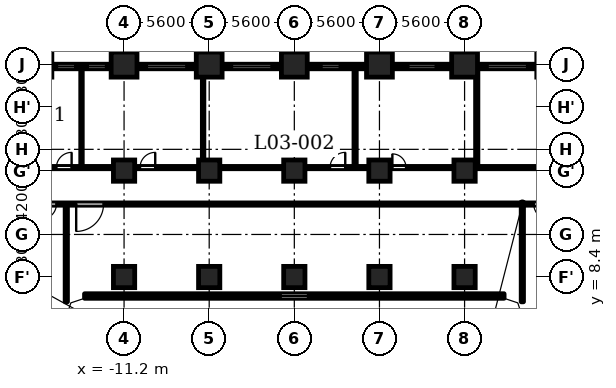
"""IFC4 building model, lengths in metres.
Left out: names, types, materials, properties, quantities, classifications, styles, units other than length and angle.
Written with IfcOpenShell. Run it as: python <this file> out.ifc"""

import sys

from ifc_helpers import new_model, si_unit, direction, frame, frame_2d, origin, origin_2d, place, context, subcontext, project, spatial, polyline, rectangle, outline, extrude, element, fill, save


model = new_model("IFC4")
c1 = context("Model", 3, precision=1e-05, world=origin(), true_north=direction((0.0, 1.0)))
c2 = subcontext(c1, "Body", "Model", "MODEL_VIEW")
j1 = project(units=[si_unit("LENGTHUNIT", "METRE"), si_unit("PLANEANGLEUNIT", "RADIAN")], contexts=[c1])
p1 = place(None, origin())
s1 = spatial("IfcSite", under=j1, at=p1, CompositionType="ELEMENT")
p2 = place(p1, origin())
s2 = spatial("IfcBuilding", under=s1, at=p2, CompositionType="ELEMENT")
p3 = place(p2, frame((0.0, 0.0, 16.1)))
s3 = spatial("IfcBuildingStorey", under=s2, at=p3, CompositionType="ELEMENT", Elevation=16.1)
for number, where, z_axis, x_axis in (
    (1, (11.2, 22.4, 0.0), (0.0, 0.0, 1.0), (1.0, 0.0, 0.0)),
    (2, (5.6, 22.4, 0.0), (0.0, 0.0, 1.0), (1.0, 0.0, 0.0)),
    (3, (0.0, 22.4, 0.0), (0.0, 0.0, 1.0), (1.0, 0.0, 0.0)),
    (4, (-5.6, 22.4, 0.0), (0.0, 0.0, 1.0), (1.0, 0.0, 0.0)),
    (5, (-11.2, 22.4, 0.0), (0.0, 0.0, 1.0), (1.0, 0.0, 0.0)),
):
    element("IfcColumn", number, at=place(p3, frame(where, z_axis=z_axis, x_axis=x_axis)), inside=s3, PredefinedType="COLUMN", context=c2, shape_type="SweptSolid", body=[
        extrude(rectangle(XDim=1.7, YDim=1.7, at=origin_2d()), origin(), (0.0, 0.0, 1.0), 4.8),
    ])
for number, where, z_axis, x_axis in (
    (6, (-11.2, 8.4, 0.0), (0.0, 0.0, 1.0), (1.0, 0.0, 0.0)),
    (7, (-5.6, 8.4, 0.0), (0.0, 0.0, 1.0), (1.0, 0.0, 0.0)),
    (8, (0.0, 8.4, 0.0), (0.0, 0.0, 1.0), (1.0, 0.0, 0.0)),
    (9, (5.6, 8.4, 0.0), (0.0, 0.0, 1.0), (1.0, 0.0, 0.0)),
    (10, (11.2, 8.4, 0.0), (0.0, 0.0, 1.0), (1.0, 0.0, 0.0)),
    (11, (-11.2, 15.4, 0.0), (0.0, 0.0, 1.0), (1.0, 0.0, 0.0)),
    (12, (-5.6, 15.4, 0.0), (0.0, 0.0, 1.0), (1.0, 0.0, 0.0)),
    (13, (0.0, 15.4, 0.0), (0.0, 0.0, 1.0), (1.0, 0.0, 0.0)),
    (14, (5.6, 15.4, 0.0), (0.0, 0.0, 1.0), (1.0, 0.0, 0.0)),
    (15, (11.2, 15.4, 0.0), (0.0, 0.0, 1.0), (1.0, 0.0, 0.0)),
):
    element("IfcColumn", number, at=place(p3, frame(where, z_axis=z_axis, x_axis=x_axis)), inside=s3, PredefinedType="COLUMN", context=c2, shape_type="SweptSolid", body=[
        extrude(rectangle(XDim=1.4, YDim=1.4, at=origin_2d()), origin(), (0.0, 0.0, 1.0), 4.8),
    ])
p4 = place(p3, frame((15.95, 22.25, 0.0), z_axis=(0.0, 0.0, 1.0), x_axis=(-1.0, 0.0, 0.0)))
e16 = element("IfcWall", 16, at=p4, inside=s3, PredefinedType="SOLIDWALL", context=c2, shape_type="SweptSolid", body=[
    extrude(rectangle(XDim=3.9, YDim=0.3, at=frame_2d((1.95, 0.0))), origin(), (0.0, 0.0, 1.0), 3.55),
])
p5 = place(p4, frame((0.637, 0.0, 0.9)))
e17 = element("IfcOpeningElement", 17, at=p5, cuts=e16, PredefinedType="OPENING", context=c2, shape_type="SweptSolid", body=[
    extrude(rectangle(XDim=2.6, YDim=1.25, at=frame_2d((1.3, 0.625))), frame((0.0, 0.16, 0.0), z_axis=(0.0, -1.0, 0.0), x_axis=(1.0, 0.0, 0.0)), (0.0, 0.0, 1.0), 0.32),
])
p6 = place(p3, frame((10.35, 22.25, 0.0), z_axis=(0.0, 0.0, 1.0), x_axis=(-1.0, 0.0, 0.0)))
e18 = element("IfcWall", 18, at=p6, inside=s3, PredefinedType="SOLIDWALL", context=c2, shape_type="SweptSolid", body=[
    extrude(rectangle(XDim=3.9, YDim=0.3, at=frame_2d((1.95, 0.0))), origin(), (0.0, 0.0, 1.0), 3.55),
])
p7 = place(p6, frame((1.05, 0.0, 0.9)))
e19 = element("IfcOpeningElement", 19, at=p7, cuts=e18, PredefinedType="OPENING", context=c2, shape_type="SweptSolid", body=[
    extrude(rectangle(XDim=1.8, YDim=1.25, at=frame_2d((0.9, 0.625))), frame((0.0, 0.16, 0.0), z_axis=(0.0, -1.0, 0.0), x_axis=(1.0, 0.0, 0.0)), (0.0, 0.0, 1.0), 0.32),
])
p8 = place(p3, frame((4.75, 22.25, 0.0), z_axis=(0.0, 0.0, 1.0), x_axis=(-1.0, 0.0, 0.0)))
e20 = element("IfcWall", 20, at=p8, inside=s3, PredefinedType="SOLIDWALL", context=c2, shape_type="SweptSolid", body=[
    extrude(rectangle(XDim=3.9, YDim=0.3, at=frame_2d((1.95, 0.0))), origin(), (0.0, 0.0, 1.0), 3.55),
])
p9 = place(p8, frame((1.762, 0.0, 0.6)))
e21 = element("IfcOpeningElement", 21, at=p9, cuts=e20, PredefinedType="OPENING", context=c2, shape_type="SweptSolid", body=[
    extrude(rectangle(XDim=1.2, YDim=1.55, at=frame_2d((0.6, 0.775))), frame((0.0, 0.16, 0.0), z_axis=(0.0, -1.0, 0.0), x_axis=(1.0, 0.0, 0.0)), (0.0, 0.0, 1.0), 0.32),
])
p10 = place(p3, frame((-0.85, 22.25, 0.0), z_axis=(0.0, 0.0, 1.0), x_axis=(-1.0, 0.0, 0.0)))
e22 = element("IfcWall", 22, at=p10, inside=s3, PredefinedType="SOLIDWALL", context=c2, shape_type="SweptSolid", body=[
    extrude(rectangle(XDim=3.9, YDim=0.3, at=frame_2d((1.95, 0.0))), origin(), (0.0, 0.0, 1.0), 3.55),
])
p11 = place(p10, frame((0.65, 0.0, 0.9)))
e23 = element("IfcOpeningElement", 23, at=p11, cuts=e22, PredefinedType="OPENING", context=c2, shape_type="SweptSolid", body=[
    extrude(rectangle(XDim=2.6, YDim=1.25, at=frame_2d((1.3, 0.625))), frame((0.0, 0.16, 0.0), z_axis=(0.0, -1.0, 0.0), x_axis=(1.0, 0.0, 0.0)), (0.0, 0.0, 1.0), 0.32),
])
p12 = place(p3, frame((-6.45, 22.25, 0.0), z_axis=(0.0, 0.0, 1.0), x_axis=(-1.0, 0.0, 0.0)))
e24 = element("IfcWall", 24, at=p12, inside=s3, PredefinedType="SOLIDWALL", context=c2, shape_type="SweptSolid", body=[
    extrude(rectangle(XDim=3.9, YDim=0.3, at=frame_2d((1.95, 0.0))), origin(), (0.0, 0.0, 1.0), 3.55),
])
p13 = place(p12, frame((0.65, 0.0, 0.9)))
e25 = element("IfcOpeningElement", 25, at=p13, cuts=e24, PredefinedType="OPENING", context=c2, shape_type="SweptSolid", body=[
    extrude(rectangle(XDim=2.6, YDim=1.25, at=frame_2d((1.3, 0.625))), frame((0.0, 0.16, 0.0), z_axis=(0.0, -1.0, 0.0), x_axis=(1.0, 0.0, 0.0)), (0.0, 0.0, 1.0), 0.32),
])
p14 = place(p3, frame((-12.05, 22.25, 0.0), z_axis=(0.0, 0.0, 1.0), x_axis=(-1.0, 0.0, 0.0)))
e26 = element("IfcWall", 26, at=p14, inside=s3, PredefinedType="SOLIDWALL", context=c2, shape_type="SweptSolid", body=[
    extrude(rectangle(XDim=3.9, YDim=0.3, at=frame_2d((1.95, 0.0))), origin(), (0.0, 0.0, 1.0), 3.55),
])
p15 = place(p14, frame((0.337, 0.0, 0.6)))
e27 = element("IfcOpeningElement", 27, at=p15, cuts=e26, PredefinedType="OPENING", context=c2, shape_type="SweptSolid", body=[
    extrude(rectangle(XDim=1.2, YDim=1.55, at=frame_2d((0.6, 0.775))), frame((0.0, 0.16, 0.0), z_axis=(0.0, -1.0, 0.0), x_axis=(1.0, 0.0, 0.0)), (0.0, 0.0, 1.0), 0.32),
])
p16 = place(p14, frame((2.363, 0.0, 0.6)))
e28 = element("IfcOpeningElement", 28, at=p16, cuts=e26, PredefinedType="OPENING", context=c2, shape_type="SweptSolid", body=[
    extrude(rectangle(XDim=1.2, YDim=1.55, at=frame_2d((0.6, 0.775))), frame((0.0, 0.16, 0.0), z_axis=(0.0, -1.0, 0.0), x_axis=(1.0, 0.0, 0.0)), (0.0, 0.0, 1.0), 0.32),
])
p17 = place(p3, frame((-13.8, 7.15, 0.0), z_axis=(0.0, 0.0, 1.0), x_axis=(1.0, 0.0, 0.0)))
e29 = element("IfcWall", 29, at=p17, inside=s3, PredefinedType="SOLIDWALL", context=c2, shape_type="SweptSolid", body=[
    extrude(rectangle(XDim=27.6, YDim=0.3, at=frame_2d((13.8, 0.0))), origin(), (0.0, 0.0, 1.0), 4.45),
])
p18 = place(p17, frame((12.9, 0.0, 0.9)))
e30 = element("IfcOpeningElement", 30, at=p18, cuts=e29, PredefinedType="OPENING", context=c2, shape_type="SweptSolid", body=[
    extrude(rectangle(XDim=1.8, YDim=1.25, at=frame_2d((0.9, 0.625))), frame((0.0, 0.16, 0.0), z_axis=(0.0, -1.0, 0.0), x_axis=(1.0, 0.0, 0.0)), (0.0, 0.0, 1.0), 0.32),
])
p19 = place(p3, frame((-17.4, 13.2, 0.0), z_axis=(0.0, 0.0, 1.0), x_axis=(1.0, 0.0, 0.0)))
e31 = element("IfcWall", 31, at=p19, inside=s3, PredefinedType="PARTITIONING", context=c2, shape_type="SweptSolid", body=[
    extrude(rectangle(XDim=34.8, YDim=0.15, at=frame_2d((17.4, 0.0))), origin(), (0.0, 0.0, 1.0), 4.45),
])
p20 = place(p19, frame((3.05, 0.0, 0.0)))
e32 = element("IfcOpeningElement", 32, at=p20, cuts=e31, PredefinedType="OPENING", context=c2, shape_type="SweptSolid", body=[
    extrude(rectangle(XDim=1.8, YDim=2.1, at=frame_2d((0.9, 1.05))), frame((0.0, 0.085, 0.0), z_axis=(0.0, -1.0, 0.0), x_axis=(1.0, 0.0, 0.0)), (0.0, 0.0, 1.0), 0.17),
])
p21 = place(p19, frame((0.75, 0.0, 0.0)))
e33 = element("IfcOpeningElement", 33, at=p21, cuts=e31, PredefinedType="OPENING", context=c2, shape_type="SweptSolid", body=[
    extrude(rectangle(XDim=1.0, YDim=2.1, at=frame_2d((0.5, 1.05))), frame((0.0, 0.085, 0.0), z_axis=(0.0, -1.0, 0.0), x_axis=(1.0, 0.0, 0.0)), (0.0, 0.0, 1.0), 0.17),
])
p22 = place(p19, frame((33.15, 0.0, 0.0)))
e34 = element("IfcOpeningElement", 34, at=p22, cuts=e31, PredefinedType="OPENING", context=c2, shape_type="SweptSolid", body=[
    extrude(rectangle(XDim=1.0, YDim=2.1, at=frame_2d((0.5, 1.05))), frame((0.0, 0.085, 0.0), z_axis=(0.0, -1.0, 0.0), x_axis=(1.0, 0.0, 0.0)), (0.0, 0.0, 1.0), 0.17),
])
p23 = place(p3, frame((-27.446, 15.6, 0.0), z_axis=(0.0, 0.0, 1.0), x_axis=(1.0, 0.0, 0.0)))
e35 = element("IfcWall", 35, at=p23, inside=s3, PredefinedType="PARTITIONING", context=c2, shape_type="SweptSolid", body=[
    extrude(rectangle(XDim=54.892, YDim=0.15, at=frame_2d((27.446, 0.0))), origin(), (0.0, 0.0, 1.0), 4.45),
])
p24 = place(p23, frame((11.796, 0.0, 0.0)))
e36 = element("IfcOpeningElement", 36, at=p24, cuts=e35, PredefinedType="OPENING", context=c2, shape_type="SweptSolid", body=[
    extrude(rectangle(XDim=1.0, YDim=2.1, at=frame_2d((0.5, 1.05))), frame((0.0, 0.085, 0.0), z_axis=(0.0, -1.0, 0.0), x_axis=(1.0, 0.0, 0.0)), (0.0, 0.0, 1.0), 0.17),
])
p25 = place(p23, frame((17.296, 0.0, 0.0)))
e37 = element("IfcOpeningElement", 37, at=p25, cuts=e35, PredefinedType="OPENING", context=c2, shape_type="SweptSolid", body=[
    extrude(rectangle(XDim=1.0, YDim=2.1, at=frame_2d((0.5, 1.05))), frame((0.0, 0.085, 0.0), z_axis=(0.0, -1.0, 0.0), x_axis=(1.0, 0.0, 0.0)), (0.0, 0.0, 1.0), 0.17),
])
p26 = place(p23, frame((29.796, 0.0, 0.0)))
e38 = element("IfcOpeningElement", 38, at=p26, cuts=e35, PredefinedType="OPENING", context=c2, shape_type="SweptSolid", body=[
    extrude(rectangle(XDim=1.0, YDim=2.1, at=frame_2d((0.5, 1.05))), frame((0.0, 0.085, 0.0), z_axis=(0.0, -1.0, 0.0), x_axis=(1.0, 0.0, 0.0)), (0.0, 0.0, 1.0), 0.17),
])
p27 = place(p23, frame((33.896, 0.0, 0.0)))
e39 = element("IfcOpeningElement", 39, at=p27, cuts=e35, PredefinedType="OPENING", context=c2, shape_type="SweptSolid", body=[
    extrude(rectangle(XDim=0.9, YDim=2.1, at=frame_2d((0.45, 1.05))), frame((0.0, 0.085, 0.0), z_axis=(0.0, -1.0, 0.0), x_axis=(1.0, 0.0, 0.0)), (0.0, 0.0, 1.0), 0.17),
])
p28 = place(p23, frame((52.975, 0.0, 0.0)))
e40 = element("IfcOpeningElement", 40, at=p28, cuts=e35, PredefinedType="OPENING", context=c2, shape_type="SweptSolid", body=[
    extrude(rectangle(XDim=1.0, YDim=2.1, at=frame_2d((0.5, 1.05))), frame((0.0, 0.085, 0.0), z_axis=(0.0, -1.0, 0.0), x_axis=(1.0, 0.0, 0.0)), (0.0, 0.0, 1.0), 0.17),
])
p29 = place(p3, frame((-15.0, 6.769, 0.0), z_axis=(0.0, 0.0, 1.0), x_axis=(0.0, 1.0, 0.0)))
e41 = element("IfcWall", 41, at=p29, inside=s3, PredefinedType="PARTITIONING", context=c2, shape_type="SweptSolid", body=[
    extrude(rectangle(XDim=6.356, YDim=0.15, at=frame_2d((3.178, 0.0))), origin(), (0.0, 0.0, 1.0), 4.45),
])
p30 = place(p3, frame((-14.0, 15.675, 0.0), z_axis=(0.0, 0.0, 1.0), x_axis=(0.0, 1.0, 0.0)))
e42 = element("IfcWall", 42, at=p30, inside=s3, PredefinedType="PARTITIONING", context=c2, shape_type="SweptSolid", body=[
    extrude(rectangle(XDim=6.405, YDim=0.1, at=frame_2d((3.203, 0.0))), origin(), (0.0, 0.0, 1.0), 4.45),
])
p31 = place(p3, frame((-6.0, 15.675, 0.0), z_axis=(0.0, 0.0, 1.0), x_axis=(0.0, 1.0, 0.0)))
e43 = element("IfcWall", 43, at=p31, inside=s3, PredefinedType="PARTITIONING", context=c2, shape_type="SweptSolid", body=[
    extrude(rectangle(XDim=6.635, YDim=0.1, at=frame_2d((3.317, 0.0))), origin(), (0.0, 0.0, 1.0), 4.45),
])
p32 = place(p3, frame((4.0, 15.675, 0.0), z_axis=(0.0, 0.0, 1.0), x_axis=(0.0, 1.0, 0.0)))
e44 = element("IfcWall", 44, at=p32, inside=s3, PredefinedType="PARTITIONING", context=c2, shape_type="SweptSolid", body=[
    extrude(rectangle(XDim=6.405, YDim=0.15, at=frame_2d((3.203, 0.0))), origin(), (0.0, 0.0, 1.0), 4.45),
])
p33 = place(p3, frame((12.0, 15.675, 0.0), z_axis=(0.0, 0.0, 1.0), x_axis=(0.0, 1.0, 0.0)))
e45 = element("IfcWall", 45, at=p33, inside=s3, PredefinedType="PARTITIONING", context=c2, shape_type="SweptSolid", body=[
    extrude(rectangle(XDim=6.635, YDim=0.15, at=frame_2d((3.317, 0.0))), origin(), (0.0, 0.0, 1.0), 4.45),
])
p34 = place(p3, frame((15.0, 6.769, 0.0), z_axis=(0.0, 0.0, 1.0), x_axis=(0.0, 1.0, 0.0)))
e46 = element("IfcWall", 46, at=p34, inside=s3, PredefinedType="PARTITIONING", context=c2, shape_type="SweptSolid", body=[
    extrude(rectangle(XDim=6.356, YDim=0.15, at=frame_2d((3.178, 0.0))), origin(), (0.0, 0.0, 1.0), 4.45),
])
p35 = place(p3, origin())
e47 = element("IfcWall", 47, at=p35, inside=s3, PredefinedType="SOLIDWALL", context=c2, shape_type="SweptSolid", body=[
    extrude(outline(polyline([(-13.849, 7.3), (-14.937, 6.937), (-15.3, 5.849), (-15.3, 5.8), (-15.0, 5.8), (-14.7, 6.7), (-13.8, 7.0), (-13.8, 7.3), (-13.849, 7.3)])), origin(), (0.0, 0.0, 1.0), 4.45),
])
e48 = element("IfcWall", 48, at=p35, inside=s3, PredefinedType="SOLIDWALL", context=c2, shape_type="SweptSolid", body=[
    extrude(outline(polyline([(14.937, 6.937), (13.849, 7.3), (13.8, 7.3), (13.8, 7.0), (14.7, 6.7), (15.0, 5.8), (15.3, 5.8), (15.3, 5.849), (14.937, 6.937)])), origin(), (0.0, 0.0, 1.0), 4.45),
])
p36 = place(p20, origin())
e49 = element("IfcDoor", 49, at=p36, inside=s3, OperationType="SINGLE_SWING_LEFT", PredefinedType="DOOR", context=c2, shape_type="SweptSolid", body=[
    extrude(rectangle(XDim=1.8, YDim=2.1, at=frame_2d((0.9, 1.05))), frame((0.0, 0.025, 0.0), z_axis=(0.0, -1.0, 0.0), x_axis=(1.0, 0.0, 0.0)), (0.0, 0.0, 1.0), 0.05),
])
fill(e32, e49)
p37 = place(p21, origin())
e50 = element("IfcDoor", 50, at=p37, inside=s3, OperationType="SINGLE_SWING_LEFT", PredefinedType="DOOR", context=c2, shape_type="SweptSolid", body=[
    extrude(rectangle(XDim=1.0, YDim=2.1, at=frame_2d((0.5, 1.05))), frame((0.0, 0.025, 0.0), z_axis=(0.0, -1.0, 0.0), x_axis=(1.0, 0.0, 0.0)), (0.0, 0.0, 1.0), 0.05),
])
fill(e33, e50)
p38 = place(p22, origin())
e51 = element("IfcDoor", 51, at=p38, inside=s3, OperationType="SINGLE_SWING_RIGHT", PredefinedType="DOOR", context=c2, shape_type="SweptSolid", body=[
    extrude(rectangle(XDim=1.0, YDim=2.1, at=frame_2d((0.5, 1.05))), frame((0.0, 0.025, 0.0), z_axis=(0.0, -1.0, 0.0), x_axis=(1.0, 0.0, 0.0)), (0.0, 0.0, 1.0), 0.05),
])
fill(e34, e51)
p39 = place(p24, origin())
e52 = element("IfcDoor", 52, at=p39, inside=s3, OperationType="SINGLE_SWING_LEFT", PredefinedType="DOOR", context=c2, shape_type="SweptSolid", body=[
    extrude(rectangle(XDim=1.0, YDim=2.1, at=frame_2d((0.5, 1.05))), frame((0.0, 0.025, 0.0), z_axis=(0.0, -1.0, 0.0), x_axis=(1.0, 0.0, 0.0)), (0.0, 0.0, 1.0), 0.05),
])
fill(e36, e52)
p40 = place(p25, origin())
e53 = element("IfcDoor", 53, at=p40, inside=s3, OperationType="SINGLE_SWING_LEFT", PredefinedType="DOOR", context=c2, shape_type="SweptSolid", body=[
    extrude(rectangle(XDim=1.0, YDim=2.1, at=frame_2d((0.5, 1.05))), frame((0.0, 0.025, 0.0), z_axis=(0.0, -1.0, 0.0), x_axis=(1.0, 0.0, 0.0)), (0.0, 0.0, 1.0), 0.05),
])
fill(e37, e53)
p41 = place(p26, origin())
e54 = element("IfcDoor", 54, at=p41, inside=s3, OperationType="SINGLE_SWING_LEFT", PredefinedType="DOOR", context=c2, shape_type="SweptSolid", body=[
    extrude(rectangle(XDim=1.0, YDim=2.1, at=frame_2d((0.5, 1.05))), frame((0.0, 0.025, 0.0), z_axis=(0.0, -1.0, 0.0), x_axis=(1.0, 0.0, 0.0)), (0.0, 0.0, 1.0), 0.05),
])
fill(e38, e54)
p42 = place(p27, origin())
e55 = element("IfcDoor", 55, at=p42, inside=s3, OperationType="SINGLE_SWING_RIGHT", PredefinedType="DOOR", context=c2, shape_type="SweptSolid", body=[
    extrude(rectangle(XDim=0.9, YDim=2.1, at=frame_2d((0.45, 1.05))), frame((0.0, 0.025, 0.0), z_axis=(0.0, -1.0, 0.0), x_axis=(1.0, 0.0, 0.0)), (0.0, 0.0, 1.0), 0.05),
])
fill(e39, e55)
p43 = place(p5, origin())
e56 = element("IfcWindow", 56, at=p43, inside=s3, PartitioningType="SINGLE_PANEL", PredefinedType="WINDOW", context=c2, shape_type="SweptSolid", body=[
    extrude(rectangle(XDim=2.6, YDim=1.25, at=frame_2d((1.3, 0.625))), frame((0.0, 0.03, 0.0), z_axis=(0.0, -1.0, 0.0), x_axis=(1.0, 0.0, 0.0)), (0.0, 0.0, 1.0), 0.06),
])
fill(e17, e56)
p44 = place(p7, origin())
e57 = element("IfcWindow", 57, at=p44, inside=s3, PartitioningType="SINGLE_PANEL", PredefinedType="WINDOW", context=c2, shape_type="SweptSolid", body=[
    extrude(rectangle(XDim=1.8, YDim=1.25, at=frame_2d((0.9, 0.625))), frame((0.0, 0.03, 0.0), z_axis=(0.0, -1.0, 0.0), x_axis=(1.0, 0.0, 0.0)), (0.0, 0.0, 1.0), 0.06),
])
fill(e19, e57)
p45 = place(p9, origin())
e58 = element("IfcWindow", 58, at=p45, inside=s3, PartitioningType="SINGLE_PANEL", PredefinedType="WINDOW", context=c2, shape_type="SweptSolid", body=[
    extrude(rectangle(XDim=1.2, YDim=1.55, at=frame_2d((0.6, 0.775))), frame((0.0, 0.03, 0.0), z_axis=(0.0, -1.0, 0.0), x_axis=(1.0, 0.0, 0.0)), (0.0, 0.0, 1.0), 0.06),
])
fill(e21, e58)
p46 = place(p11, origin())
e59 = element("IfcWindow", 59, at=p46, inside=s3, PartitioningType="SINGLE_PANEL", PredefinedType="WINDOW", context=c2, shape_type="SweptSolid", body=[
    extrude(rectangle(XDim=2.6, YDim=1.25, at=frame_2d((1.3, 0.625))), frame((0.0, 0.03, 0.0), z_axis=(0.0, -1.0, 0.0), x_axis=(1.0, 0.0, 0.0)), (0.0, 0.0, 1.0), 0.06),
])
fill(e23, e59)
p47 = place(p13, origin())
e60 = element("IfcWindow", 60, at=p47, inside=s3, PartitioningType="SINGLE_PANEL", PredefinedType="WINDOW", context=c2, shape_type="SweptSolid", body=[
    extrude(rectangle(XDim=2.6, YDim=1.25, at=frame_2d((1.3, 0.625))), frame((0.0, 0.03, 0.0), z_axis=(0.0, -1.0, 0.0), x_axis=(1.0, 0.0, 0.0)), (0.0, 0.0, 1.0), 0.06),
])
fill(e25, e60)
p48 = place(p15, origin())
e61 = element("IfcWindow", 61, at=p48, inside=s3, PartitioningType="SINGLE_PANEL", PredefinedType="WINDOW", context=c2, shape_type="SweptSolid", body=[
    extrude(rectangle(XDim=1.2, YDim=1.55, at=frame_2d((0.6, 0.775))), frame((0.0, 0.03, 0.0), z_axis=(0.0, -1.0, 0.0), x_axis=(1.0, 0.0, 0.0)), (0.0, 0.0, 1.0), 0.06),
])
fill(e27, e61)
p49 = place(p16, origin())
e62 = element("IfcWindow", 62, at=p49, inside=s3, PartitioningType="SINGLE_PANEL", PredefinedType="WINDOW", context=c2, shape_type="SweptSolid", body=[
    extrude(rectangle(XDim=1.2, YDim=1.55, at=frame_2d((0.6, 0.775))), frame((0.0, 0.03, 0.0), z_axis=(0.0, -1.0, 0.0), x_axis=(1.0, 0.0, 0.0)), (0.0, 0.0, 1.0), 0.06),
])
fill(e28, e62)
p50 = place(p18, origin())
e63 = element("IfcWindow", 63, at=p50, inside=s3, PartitioningType="SINGLE_PANEL", PredefinedType="WINDOW", context=c2, shape_type="SweptSolid", body=[
    extrude(rectangle(XDim=1.8, YDim=1.25, at=frame_2d((0.9, 0.625))), frame((0.0, 0.03, 0.0), z_axis=(0.0, -1.0, 0.0), x_axis=(1.0, 0.0, 0.0)), (0.0, 0.0, 1.0), 0.06),
])
fill(e30, e63)
save(model, sys.argv[1])
